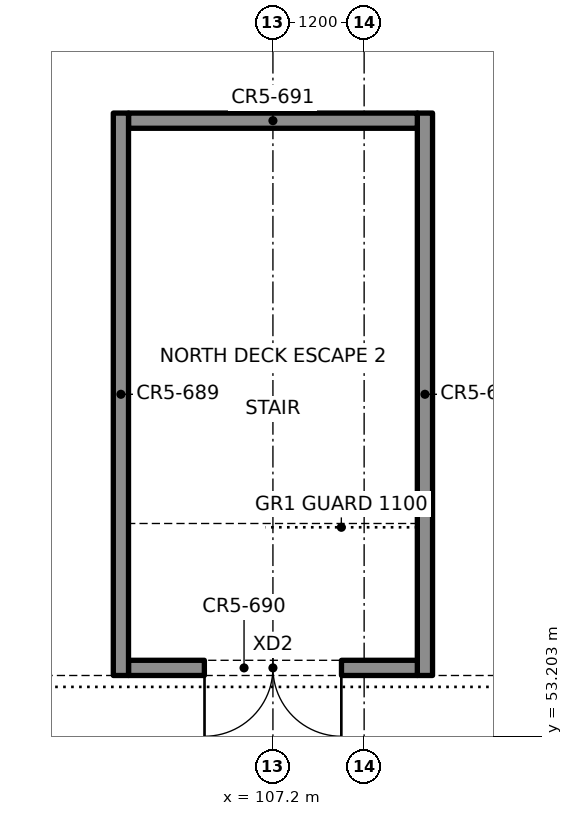
"""IFC4 building model, lengths in metres.
Left out: names, types, materials, properties, quantities, classifications, styles, units other than length and angle.
Written with IfcOpenShell. Run it as: python <this file> out.ifc"""

import sys

from ifc_helpers import new_model, si_unit, direction, frame, frame_2d, origin, place, context, subcontext, project, spatial, rectangle, extrude, element, fill, save


model = new_model("IFC4")
c1 = context("Model", 3, precision=1e-05, world=origin(), true_north=direction((0.0, 1.0)))
c2 = subcontext(c1, "Body", "Model", "MODEL_VIEW")
j1 = project(units=[si_unit("LENGTHUNIT", "METRE"), si_unit("PLANEANGLEUNIT", "RADIAN")], contexts=[c1])
p1 = place(None, origin())
s1 = spatial("IfcSite", under=j1, at=p1, CompositionType="ELEMENT")
p2 = place(p1, origin())
s2 = spatial("IfcBuilding", under=s1, at=p2, CompositionType="ELEMENT")
p3 = place(p2, frame((0.0, 0.0, 14.0)))
s3 = spatial("IfcBuildingStorey", under=s2, at=p3, CompositionType="ELEMENT", Elevation=14.0)
for number, where, z_axis, x_axis in (
    (1, (105.2, 54.0, 0.0), (0.0, 0.0, 1.0), (0.0, 1.0, 0.0)),
    (2, (109.2, 61.4, 0.0), (0.0, 0.0, 1.0), (0.0, -1.0, 0.0)),
):
    element("IfcWall", number, at=place(p3, frame(where, z_axis=z_axis, x_axis=x_axis)), inside=s3, PredefinedType="SOLIDWALL", context=c2, shape_type="SweptSolid", body=[
        extrude(rectangle(XDim=7.4, YDim=0.2, at=frame_2d((3.7, 0.0))), origin(), (0.0, 0.0, 1.0), 3.0),
    ])
p4 = place(p3, frame((105.3, 54.1, 0.0), z_axis=(0.0, 0.0, 1.0), x_axis=(1.0, 0.0, 0.0)))
e3 = element("IfcWall", 3, at=p4, inside=s3, PredefinedType="SOLIDWALL", context=c2, shape_type="SweptSolid", body=[
    extrude(rectangle(XDim=3.8, YDim=0.2, at=frame_2d((1.9, 0.0))), origin(), (0.0, 0.0, 1.0), 3.0),
])
p5 = place(p4, frame((1.0, 0.0, 0.0)))
e4 = element("IfcOpeningElement", 4, at=p5, cuts=e3, PredefinedType="OPENING", context=c2, shape_type="SweptSolid", body=[
    extrude(rectangle(XDim=1.8, YDim=2.1, at=frame_2d((0.9, 1.05))), frame((0.0, 0.11, 0.0), z_axis=(0.0, -1.0, 0.0), x_axis=(1.0, 0.0, 0.0)), (0.0, 0.0, 1.0), 0.22),
])
p6 = place(p3, frame((105.3, 61.3, 0.0), z_axis=(0.0, 0.0, 1.0), x_axis=(1.0, 0.0, 0.0)))
e5 = element("IfcWall", 5, at=p6, inside=s3, PredefinedType="SOLIDWALL", context=c2, shape_type="SweptSolid", body=[
    extrude(rectangle(XDim=3.8, YDim=0.2, at=frame_2d((1.9, 0.0))), origin(), (0.0, 0.0, 1.0), 3.0),
])
p7 = place(p5, origin())
e6 = element("IfcDoor", 6, at=p7, inside=s3, OperationType="DOUBLE_DOOR_SINGLE_SWING", PredefinedType="DOOR", context=c2, shape_type="SweptSolid", body=[
    extrude(rectangle(XDim=1.8, YDim=2.1, at=frame_2d((0.9, 1.05))), frame((0.0, 0.025, 0.0), z_axis=(0.0, -1.0, 0.0), x_axis=(1.0, 0.0, 0.0)), (0.0, 0.0, 1.0), 0.05),
])
fill(e4, e6)
save(model, sys.argv[1])
